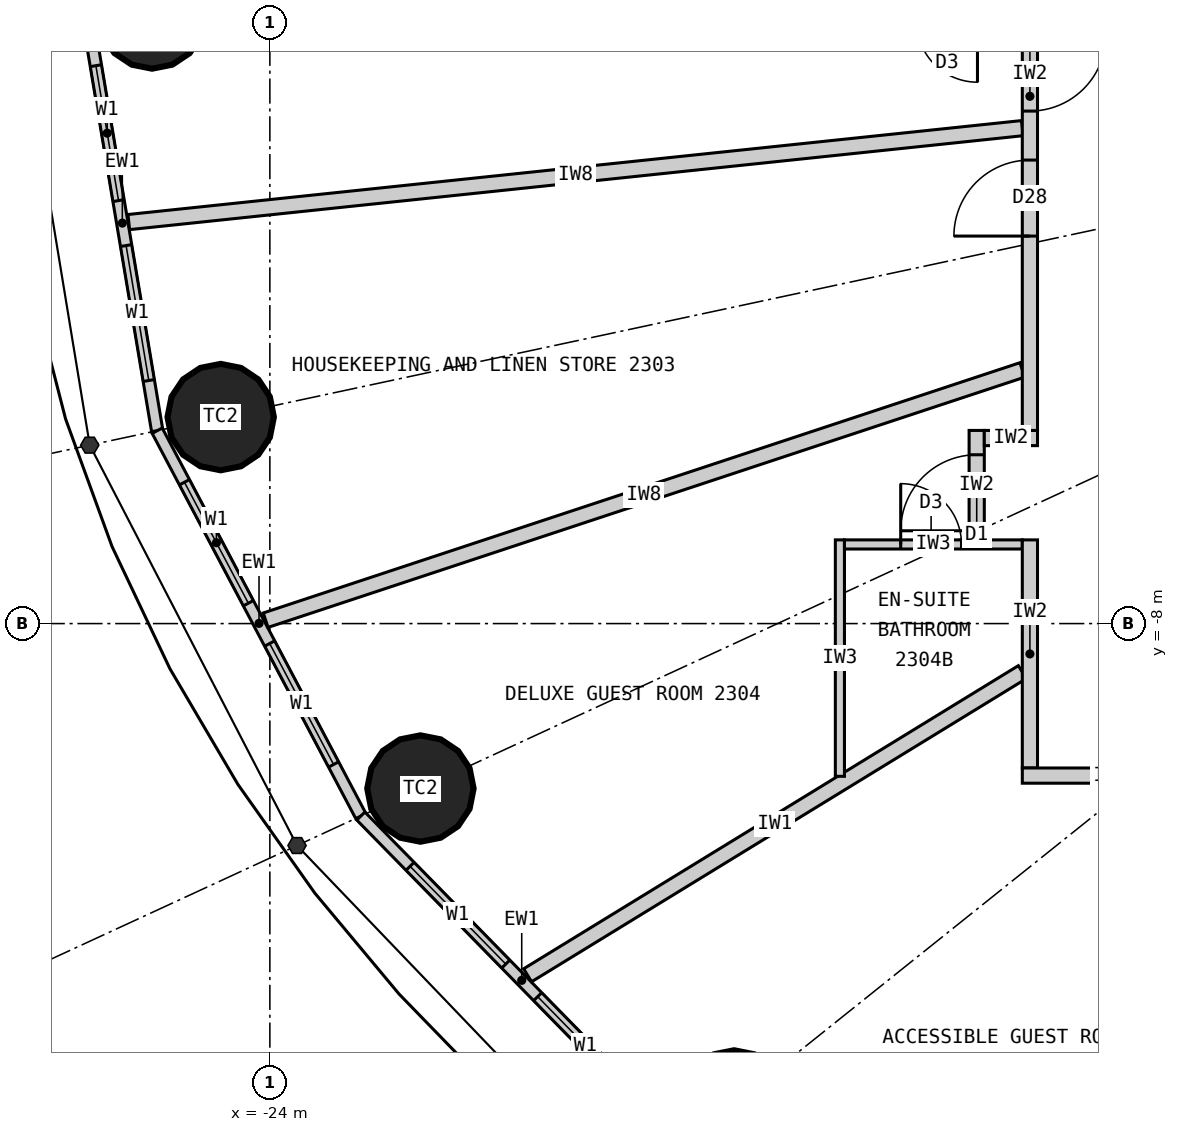
"""IFC4 building model, lengths in metres.
Left out: names, types, materials, properties, quantities, classifications, styles, units other than length and angle.
Written with IfcOpenShell. Run it as: python <this file> out.ifc"""

import sys

from ifc_helpers import new_model, si_unit, direction, frame, frame_2d, origin, origin_2d, place, context, subcontext, project, spatial, rectangle, circle, extrude, clip, halfspace, element, fill, save


model = new_model("IFC4")
c1 = context("Model", 3, precision=1e-05, world=origin(), true_north=direction((0.0, 1.0)))
c2 = subcontext(c1, "Body", "Model", "MODEL_VIEW")
j1 = project(units=[si_unit("LENGTHUNIT", "METRE"), si_unit("PLANEANGLEUNIT", "RADIAN")], contexts=[c1])
p1 = place(None, origin())
s1 = spatial("IfcSite", under=j1, at=p1, CompositionType="ELEMENT")
p2 = place(p1, origin())
s2 = spatial("IfcBuilding", under=s1, at=p2, CompositionType="ELEMENT")
p3 = place(p2, frame((0.0, 0.0, 90.3)))
s3 = spatial("IfcBuildingStorey", under=s2, at=p3, CompositionType="ELEMENT", Elevation=90.3)
for number, where, z_axis, x_axis in (
    (1, (-25.55, 0.0, 0.0), (0.0, 0.0, 1.0), (1.0, 0.0, 0.0)),
    (2, (-24.647, -5.283, 0.0), (0.0, 0.0, 1.0), (1.0, 0.0, 0.0)),
    (3, (-22.019, -10.17, 0.0), (0.0, 0.0, 1.0), (1.0, 0.0, 0.0)),
    (4, (-17.892, -14.313, 0.0), (0.0, 0.0, 1.0), (1.0, 0.0, 0.0)),
):
    element("IfcColumn", number, at=place(p3, frame(where, z_axis=z_axis, x_axis=x_axis)), inside=s3, PredefinedType="COLUMN", context=c2, shape_type="Clipping", body=[
        clip(extrude(circle(Radius=0.7, at=origin_2d()), origin(), (0.0, 0.0, 1.0), 3.3), halfspace(frame((0.0, 0.0, 2.25), z_axis=(0.0, 0.0, 1.0), x_axis=(1.0, 0.0, 0.0)), False)),
    ])
p4 = place(p3, frame((-26.4, 0.0, 0.0), z_axis=(0.0, 0.0, 1.0), x_axis=(0.165642551694, -0.986185857264, 0.0)))
e5 = element("IfcWall", 5, at=p4, inside=s3, PredefinedType="ELEMENTEDWALL", context=c2, shape_type="SweptSolid", body=[
    extrude(rectangle(XDim=5.539, YDim=0.15, at=frame_2d((2.77, 0.0))), origin(), (0.0, 0.0, 1.0), 3.05),
])
p5 = place(p4, frame((0.669, 0.0, 0.9)))
e6 = element("IfcOpeningElement", 6, at=p5, cuts=e5, PredefinedType="OPENING", context=c2, shape_type="SweptSolid", body=[
    extrude(rectangle(XDim=1.8, YDim=1.9, at=frame_2d((0.9, 0.95))), frame((0.0, 0.085, 0.0), z_axis=(0.0, -1.0, 0.0), x_axis=(1.0, 0.0, 0.0)), (0.0, 0.0, 1.0), 0.17),
])
p6 = place(p4, frame((3.07, 0.0, 0.9)))
e7 = element("IfcOpeningElement", 7, at=p6, cuts=e5, PredefinedType="OPENING", context=c2, shape_type="SweptSolid", body=[
    extrude(rectangle(XDim=1.8, YDim=1.9, at=frame_2d((0.9, 0.95))), frame((0.0, 0.085, 0.0), z_axis=(0.0, -1.0, 0.0), x_axis=(1.0, 0.0, 0.0)), (0.0, 0.0, 1.0), 0.17),
])
p7 = place(p3, frame((-25.482, -5.462, 0.0), z_axis=(0.0, 0.0, 1.0), x_axis=(0.467296867008, -0.884100468321, 0.0)))
e8 = element("IfcWall", 8, at=p7, inside=s3, PredefinedType="ELEMENTEDWALL", context=c2, shape_type="SweptSolid", body=[
    extrude(rectangle(XDim=5.734, YDim=0.15, at=frame_2d((2.867, 0.0))), origin(), (0.0, 0.0, 1.0), 3.05),
])
p8 = place(p7, frame((0.767, 0.0, 0.9)))
e9 = element("IfcOpeningElement", 9, at=p8, cuts=e8, PredefinedType="OPENING", context=c2, shape_type="SweptSolid", body=[
    extrude(rectangle(XDim=1.8, YDim=1.9, at=frame_2d((0.9, 0.95))), frame((0.0, 0.085, 0.0), z_axis=(0.0, -1.0, 0.0), x_axis=(1.0, 0.0, 0.0)), (0.0, 0.0, 1.0), 0.17),
])
p9 = place(p7, frame((3.167, 0.0, 0.9)))
e10 = element("IfcOpeningElement", 10, at=p9, cuts=e8, PredefinedType="OPENING", context=c2, shape_type="SweptSolid", body=[
    extrude(rectangle(XDim=1.8, YDim=1.9, at=frame_2d((0.9, 0.95))), frame((0.0, 0.085, 0.0), z_axis=(0.0, -1.0, 0.0), x_axis=(1.0, 0.0, 0.0)), (0.0, 0.0, 1.0), 0.17),
])
p10 = place(p3, frame((-22.803, -10.532, 0.0), z_axis=(0.0, 0.0, 1.0), x_axis=(0.699602905915, -0.714531856557, 0.0)))
e11 = element("IfcWall", 11, at=p10, inside=s3, PredefinedType="ELEMENTEDWALL", context=c2, shape_type="SweptSolid", body=[
    extrude(rectangle(XDim=6.051, YDim=0.15, at=frame_2d((3.025, 0.0))), origin(), (0.0, 0.0, 1.0), 3.05),
])
p11 = place(p10, frame((0.926, 0.0, 0.9)))
e12 = element("IfcOpeningElement", 12, at=p11, cuts=e11, PredefinedType="OPENING", context=c2, shape_type="SweptSolid", body=[
    extrude(rectangle(XDim=1.8, YDim=1.9, at=frame_2d((0.9, 0.95))), frame((0.0, 0.085, 0.0), z_axis=(0.0, -1.0, 0.0), x_axis=(1.0, 0.0, 0.0)), (0.0, 0.0, 1.0), 0.17),
])
p12 = place(p10, frame((3.325, 0.0, 0.9)))
e13 = element("IfcOpeningElement", 13, at=p12, cuts=e11, PredefinedType="OPENING", context=c2, shape_type="SweptSolid", body=[
    extrude(rectangle(XDim=1.8, YDim=1.9, at=frame_2d((0.9, 0.95))), frame((0.0, 0.085, 0.0), z_axis=(0.0, -1.0, 0.0), x_axis=(1.0, 0.0, 0.0)), (0.0, 0.0, 1.0), 0.17),
])
p13 = place(p3, frame((-14.1, -1.482, 0.0), z_axis=(0.0, 0.0, 1.0), x_axis=(-0.994522076235, -0.104526742422, 0.0)))
e14 = element("IfcWall", 14, at=p13, inside=s3, PredefinedType="PARTITIONING", context=c2, shape_type="SweptSolid", body=[
    extrude(rectangle(XDim=11.821, YDim=0.2, at=frame_2d((5.91, 0.0))), origin(), (0.0, 0.0, 1.0), 2.2),
])
p14 = place(p3, frame((-14.1, -4.663, 0.0), z_axis=(0.0, 0.0, 1.0), x_axis=(-0.949432655039, -0.31397075269, 0.0)))
e15 = element("IfcWall", 15, at=p14, inside=s3, PredefinedType="PARTITIONING", context=c2, shape_type="SweptSolid", body=[
    extrude(rectangle(XDim=10.486, YDim=0.2, at=frame_2d((5.243, 0.0))), origin(), (0.0, 0.0, 1.0), 3.05),
])
p15 = place(p3, frame((-14.1, -8.639, 0.0), z_axis=(0.0, 0.0, 1.0), x_axis=(-0.852672493023, -0.522445805459, 0.0)))
e16 = element("IfcWall", 16, at=p15, inside=s3, PredefinedType="PARTITIONING", context=c2, shape_type="SweptSolid", body=[
    extrude(rectangle(XDim=7.633, YDim=0.2, at=frame_2d((3.817, 0.0))), origin(), (0.0, 0.0, 1.0), 3.05),
])
p16 = place(p3, frame((-16.5, -10.01, 0.0), z_axis=(0.0, 0.0, 1.0), x_axis=(0.0, 1.0, 0.0)))
e17 = element("IfcWall", 17, at=p16, inside=s3, PredefinedType="PARTITIONING", context=c2, shape_type="SweptSolid", body=[
    extrude(rectangle(XDim=3.111, YDim=0.12, at=frame_2d((1.555, 0.0))), origin(), (0.0, 0.0, 1.0), 3.05),
])
p17 = place(p3, frame((-14.1, -6.959, 0.0), z_axis=(0.0, 0.0, 1.0), x_axis=(-1.0, 0.0, 0.0)))
e18 = element("IfcWall", 18, at=p17, inside=s3, PredefinedType="PARTITIONING", context=c2, shape_type="SweptSolid", body=[
    extrude(rectangle(XDim=2.34, YDim=0.12, at=frame_2d((1.17, 0.0))), origin(), (0.0, 0.0, 1.0), 3.05),
])
p18 = place(p17, frame((0.8, 0.0, 0.0)))
e19 = element("IfcOpeningElement", 19, at=p18, cuts=e18, PredefinedType="OPENING", context=c2, shape_type="SweptSolid", body=[
    extrude(rectangle(XDim=0.8, YDim=2.1, at=frame_2d((0.4, 1.05))), frame((0.0, 0.07, 0.0), z_axis=(0.0, -1.0, 0.0), x_axis=(1.0, 0.0, 0.0)), (0.0, 0.0, 1.0), 0.14),
])
p19 = place(p3, frame((-14.7, -5.459, 0.0), z_axis=(0.0, 0.0, 1.0), x_axis=(0.0, -1.0, 0.0)))
e20 = element("IfcWall", 20, at=p19, inside=s3, PredefinedType="PARTITIONING", context=c2, shape_type="SweptSolid", body=[
    extrude(rectangle(XDim=1.44, YDim=0.2, at=frame_2d((0.72, 0.0))), origin(), (0.0, 0.0, 1.0), 3.05),
])
p20 = place(p19, frame((0.32, 0.0, 0.0)))
e21 = element("IfcOpeningElement", 21, at=p20, cuts=e20, PredefinedType="OPENING", context=c2, shape_type="SweptSolid", body=[
    extrude(rectangle(XDim=1.0, YDim=2.2, at=frame_2d((0.5, 1.1))), frame((0.0, 0.11, 0.0), z_axis=(0.0, -1.0, 0.0), x_axis=(1.0, 0.0, 0.0)), (0.0, 0.0, 1.0), 0.22),
])
p21 = place(p3, frame((-13.9, -5.559, 0.0), z_axis=(0.0, 0.0, 1.0), x_axis=(-1.0, 0.0, 0.0)))
e22 = element("IfcWall", 22, at=p21, inside=s3, PredefinedType="PARTITIONING", context=c2, shape_type="SweptSolid", body=[
    extrude(rectangle(XDim=0.7, YDim=0.2, at=frame_2d((0.35, 0.0))), origin(), (0.0, 0.0, 1.0), 3.05),
])
p22 = place(p3, frame((-14.0, 3.333, 0.0), z_axis=(0.0, 0.0, 1.0), x_axis=(0.0, -1.0, 0.0)))
e23 = element("IfcWall", 23, at=p22, inside=s3, PredefinedType="PARTITIONING", context=c2, shape_type="SweptSolid", body=[
    extrude(rectangle(XDim=8.792, YDim=0.2, at=frame_2d((4.396, 0.0))), origin(), (0.0, 0.0, 1.0), 3.05),
])
p23 = place(p22, frame((3.59, 0.0, 0.0)))
e24 = element("IfcOpeningElement", 24, at=p23, cuts=e23, PredefinedType="OPENING", context=c2, shape_type="SweptSolid", body=[
    extrude(rectangle(XDim=1.0, YDim=2.2, at=frame_2d((0.5, 1.1))), frame((0.0, 0.11, 0.0), z_axis=(0.0, -1.0, 0.0), x_axis=(1.0, 0.0, 0.0)), (0.0, 0.0, 1.0), 0.22),
])
p24 = place(p22, frame((5.234, 0.0, 0.0)))
e25 = element("IfcOpeningElement", 25, at=p24, cuts=e23, PredefinedType="OPENING", context=c2, shape_type="SweptSolid", body=[
    extrude(rectangle(XDim=1.0, YDim=2.2, at=frame_2d((0.5, 1.1))), frame((0.0, 0.11, 0.0), z_axis=(0.0, -1.0, 0.0), x_axis=(1.0, 0.0, 0.0)), (0.0, 0.0, 1.0), 0.22),
])
p25 = place(p3, frame((-14.0, -6.899, 0.0), z_axis=(0.0, 0.0, 1.0), x_axis=(0.0, -1.0, 0.0)))
e26 = element("IfcWall", 26, at=p25, inside=s3, PredefinedType="PARTITIONING", context=c2, shape_type="SweptSolid", body=[
    extrude(rectangle(XDim=3.001, YDim=0.2, at=frame_2d((1.5, 0.0))), origin(), (0.0, 0.0, 1.0), 3.05),
])
p26 = place(p3, frame((-11.769, -10.0, 0.0), z_axis=(0.0, 0.0, 1.0), x_axis=(-1.0, 0.0, 0.0)))
e27 = element("IfcWall", 27, at=p26, inside=s3, PredefinedType="PARTITIONING", context=c2, shape_type="SweptSolid", body=[
    extrude(rectangle(XDim=2.331, YDim=0.2, at=frame_2d((1.166, 0.0))), origin(), (0.0, 0.0, 1.0), 3.05),
])
p27 = place(p5, origin())
e28 = element("IfcWindow", 28, at=p27, inside=s3, PartitioningType="SINGLE_PANEL", PredefinedType="WINDOW", context=c2, shape_type="SweptSolid", body=[
    extrude(rectangle(XDim=1.8, YDim=1.9, at=frame_2d((0.9, 0.95))), frame((0.0, 0.03, 0.0), z_axis=(0.0, -1.0, 0.0), x_axis=(1.0, 0.0, 0.0)), (0.0, 0.0, 1.0), 0.06),
])
fill(e6, e28)
p28 = place(p6, origin())
e29 = element("IfcWindow", 29, at=p28, inside=s3, PartitioningType="SINGLE_PANEL", PredefinedType="WINDOW", context=c2, shape_type="SweptSolid", body=[
    extrude(rectangle(XDim=1.8, YDim=1.9, at=frame_2d((0.9, 0.95))), frame((0.0, 0.03, 0.0), z_axis=(0.0, -1.0, 0.0), x_axis=(1.0, 0.0, 0.0)), (0.0, 0.0, 1.0), 0.06),
])
fill(e7, e29)
p29 = place(p8, origin())
e30 = element("IfcWindow", 30, at=p29, inside=s3, PartitioningType="SINGLE_PANEL", PredefinedType="WINDOW", context=c2, shape_type="SweptSolid", body=[
    extrude(rectangle(XDim=1.8, YDim=1.9, at=frame_2d((0.9, 0.95))), frame((0.0, 0.03, 0.0), z_axis=(0.0, -1.0, 0.0), x_axis=(1.0, 0.0, 0.0)), (0.0, 0.0, 1.0), 0.06),
])
fill(e9, e30)
p30 = place(p9, origin())
e31 = element("IfcWindow", 31, at=p30, inside=s3, PartitioningType="SINGLE_PANEL", PredefinedType="WINDOW", context=c2, shape_type="SweptSolid", body=[
    extrude(rectangle(XDim=1.8, YDim=1.9, at=frame_2d((0.9, 0.95))), frame((0.0, 0.03, 0.0), z_axis=(0.0, -1.0, 0.0), x_axis=(1.0, 0.0, 0.0)), (0.0, 0.0, 1.0), 0.06),
])
fill(e10, e31)
p31 = place(p11, origin())
e32 = element("IfcWindow", 32, at=p31, inside=s3, PartitioningType="SINGLE_PANEL", PredefinedType="WINDOW", context=c2, shape_type="SweptSolid", body=[
    extrude(rectangle(XDim=1.8, YDim=1.9, at=frame_2d((0.9, 0.95))), frame((0.0, 0.03, 0.0), z_axis=(0.0, -1.0, 0.0), x_axis=(1.0, 0.0, 0.0)), (0.0, 0.0, 1.0), 0.06),
])
fill(e12, e32)
p32 = place(p12, origin())
e33 = element("IfcWindow", 33, at=p32, inside=s3, PartitioningType="SINGLE_PANEL", PredefinedType="WINDOW", context=c2, shape_type="SweptSolid", body=[
    extrude(rectangle(XDim=1.8, YDim=1.9, at=frame_2d((0.9, 0.95))), frame((0.0, 0.03, 0.0), z_axis=(0.0, -1.0, 0.0), x_axis=(1.0, 0.0, 0.0)), (0.0, 0.0, 1.0), 0.06),
])
fill(e13, e33)
p33 = place(p23, origin())
e34 = element("IfcDoor", 34, at=p33, inside=s3, OperationType="SINGLE_SWING_LEFT", PredefinedType="DOOR", context=c2, shape_type="SweptSolid", body=[
    extrude(rectangle(XDim=1.0, YDim=2.2, at=frame_2d((0.5, 1.1))), frame((0.0, 0.025, 0.0), z_axis=(0.0, -1.0, 0.0), x_axis=(1.0, 0.0, 0.0)), (0.0, 0.0, 1.0), 0.05),
])
fill(e24, e34)
p34 = place(p24, origin())
e35 = element("IfcDoor", 35, at=p34, inside=s3, OperationType="SINGLE_SWING_RIGHT", PredefinedType="DOOR", context=c2, shape_type="SweptSolid", body=[
    extrude(rectangle(XDim=1.0, YDim=2.2, at=frame_2d((0.5, 1.1))), frame((0.0, 0.025, 0.0), z_axis=(0.0, -1.0, 0.0), x_axis=(1.0, 0.0, 0.0)), (0.0, 0.0, 1.0), 0.05),
])
fill(e25, e35)
p35 = place(p18, origin())
e36 = element("IfcDoor", 36, at=p35, inside=s3, OperationType="SINGLE_SWING_RIGHT", PredefinedType="DOOR", context=c2, shape_type="SweptSolid", body=[
    extrude(rectangle(XDim=0.8, YDim=2.1, at=frame_2d((0.4, 1.05))), frame((0.0, 0.025, 0.0), z_axis=(0.0, -1.0, 0.0), x_axis=(1.0, 0.0, 0.0)), (0.0, 0.0, 1.0), 0.05),
])
fill(e19, e36)
p36 = place(p20, origin())
e37 = element("IfcDoor", 37, at=p36, inside=s3, OperationType="SINGLE_SWING_RIGHT", PredefinedType="DOOR", context=c2, shape_type="SweptSolid", body=[
    extrude(rectangle(XDim=1.0, YDim=2.2, at=frame_2d((0.5, 1.1))), frame((0.0, 0.025, 0.0), z_axis=(0.0, -1.0, 0.0), x_axis=(1.0, 0.0, 0.0)), (0.0, 0.0, 1.0), 0.05),
])
fill(e21, e37)
save(model, sys.argv[1])
